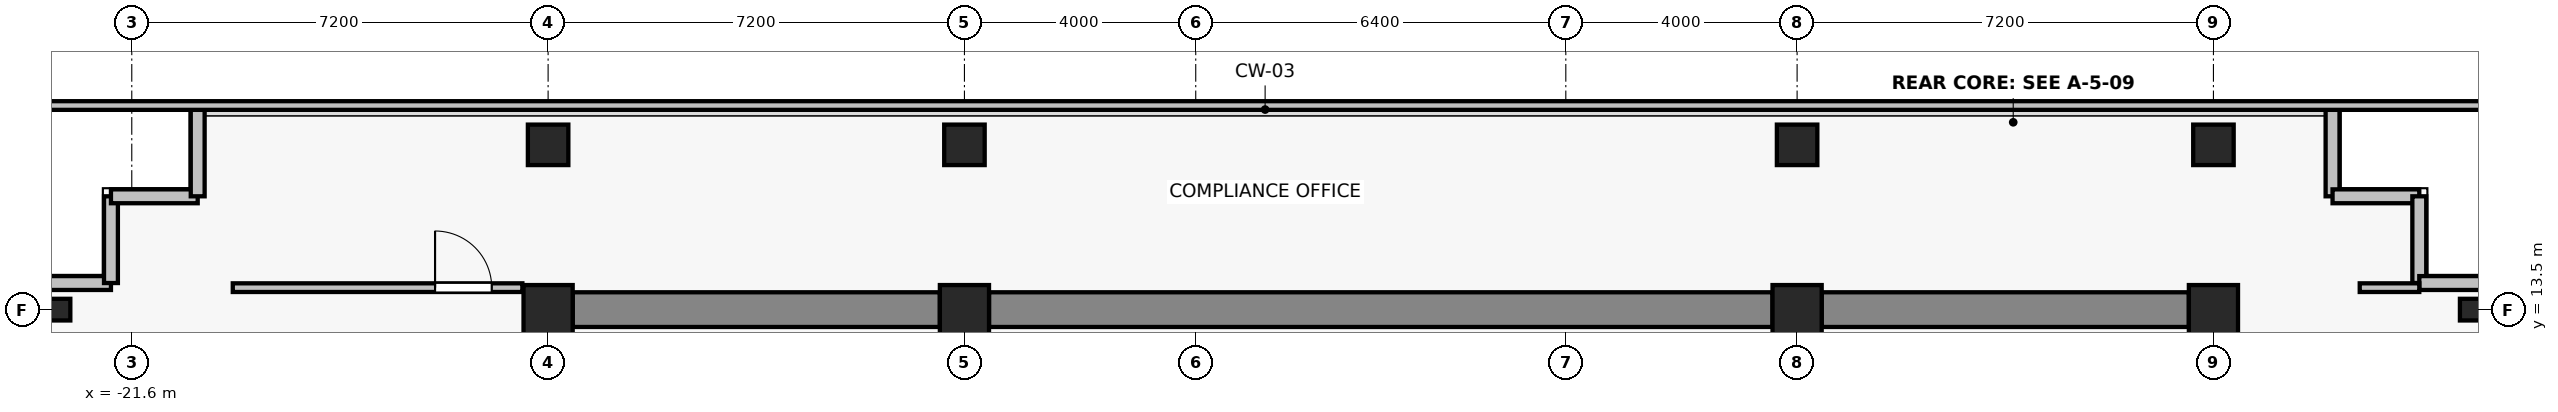
"""IFC4 building model, lengths in metres.
Left out: names, types, materials, properties, quantities, classifications, styles, units other than length and angle.
Written with IfcOpenShell. Run it as: python <this file> out.ifc"""

import sys

from ifc_helpers import new_model, si_unit, direction, frame, frame_2d, origin, origin_2d, place, context, subcontext, project, spatial, rectangle, i_section, extrude, source, transform, mapped, element, fill, save


model = new_model("IFC4")
c1 = context("Model", 3, precision=1e-05, world=origin(), true_north=direction((0.0, 1.0)))
c2 = subcontext(c1, "Body", "Model", "MODEL_VIEW")
j1 = project(units=[si_unit("LENGTHUNIT", "METRE"), si_unit("PLANEANGLEUNIT", "RADIAN")], contexts=[c1])
p1 = place(None, origin())
s1 = spatial("IfcSite", under=j1, at=p1, CompositionType="ELEMENT")
p2 = place(p1, origin())
s2 = spatial("IfcBuilding", under=s1, at=p2, CompositionType="ELEMENT")
p3 = place(p2, frame((0.0, 0.0, 228.7)))
s3 = spatial("IfcBuildingStorey", under=s2, at=p3, CompositionType="ELEMENT", Elevation=228.7)
for number, where, z_axis, x_axis in (
    (1, (-14.4, 13.5, 0.0), (0.0, 0.0, 1.0), (1.0, 0.0, 0.0)),
    (2, (-7.2, 13.5, 0.0), (0.0, 0.0, 1.0), (1.0, 0.0, 0.0)),
    (3, (7.2, 13.5, 0.0), (0.0, 0.0, 1.0), (1.0, 0.0, 0.0)),
    (4, (14.4, 13.5, 0.0), (0.0, 0.0, 1.0), (1.0, 0.0, 0.0)),
):
    element("IfcColumn", number, at=place(p3, frame(where, z_axis=z_axis, x_axis=x_axis)), inside=s3, PredefinedType="COLUMN", context=c2, shape_type="SweptSolid", body=[
        extrude(rectangle(XDim=0.85, YDim=0.85, at=origin_2d()), origin(), (0.0, 0.0, 1.0), 3.3),
    ])
for number, where, z_axis, x_axis in (
    (5, (-14.4, 16.35, 0.0), (0.0, 0.0, 1.0), (1.0, 0.0, 0.0)),
    (6, (-7.2, 16.35, 0.0), (0.0, 0.0, 1.0), (1.0, 0.0, 0.0)),
    (7, (7.2, 16.35, 0.0), (0.0, 0.0, 1.0), (1.0, 0.0, 0.0)),
    (8, (14.4, 16.35, 0.0), (0.0, 0.0, 1.0), (1.0, 0.0, 0.0)),
):
    element("IfcColumn", number, at=place(p3, frame(where, z_axis=z_axis, x_axis=x_axis)), inside=s3, PredefinedType="COLUMN", context=c2, shape_type="SweptSolid", body=[
        extrude(rectangle(XDim=0.7, YDim=0.7, at=origin_2d()), origin(), (0.0, 0.0, 1.0), 3.3),
    ])
for number, where, z_axis, x_axis in (
    (9, (-22.85, 13.5, 0.0), (0.0, 0.0, 1.0), (1.0, 0.0, 0.0)),
    (10, (18.85, 13.5, 0.0), (0.0, 0.0, 1.0), (1.0, 0.0, 0.0)),
):
    element("IfcColumn", number, at=place(p3, frame(where, z_axis=z_axis, x_axis=x_axis)), inside=s3, PredefinedType="COLUMN", context=c2, shape_type="SweptSolid", body=[
        extrude(i_section(OverallWidth=0.375, OverallDepth=0.375, WebThickness=0.017, FlangeThickness=0.027, FilletRadius=0.015, at=origin_2d()), origin(), (0.0, 0.0, 1.0), 3.3),
    ])
p4 = place(p3, frame((-13.975, 13.5, 0.0), z_axis=(0.0, 0.0, 1.0), x_axis=(1.0, 0.0, 0.0)))
e11 = element("IfcWall", 11, at=p4, inside=s3, PredefinedType="SHEAR", context=c2, shape_type="SweptSolid", body=[
    extrude(rectangle(XDim=6.35, YDim=0.6, at=frame_2d((3.175, 0.0))), origin(), (0.0, 0.0, 1.0), 3.075),
])
p5 = place(p3, frame((-6.775, 13.5, 0.0), z_axis=(0.0, 0.0, 1.0), x_axis=(1.0, 0.0, 0.0)))
e12 = element("IfcWall", 12, at=p5, inside=s3, PredefinedType="SHEAR", context=c2, shape_type="SweptSolid", body=[
    extrude(rectangle(XDim=13.55, YDim=0.6, at=frame_2d((6.775, 0.0))), origin(), (0.0, 0.0, 1.0), 3.075),
])
p6 = place(p3, frame((7.625, 13.5, 0.0), z_axis=(0.0, 0.0, 1.0), x_axis=(1.0, 0.0, 0.0)))
e13 = element("IfcWall", 13, at=p6, inside=s3, PredefinedType="SHEAR", context=c2, shape_type="SweptSolid", body=[
    extrude(rectangle(XDim=6.35, YDim=0.6, at=frame_2d((3.175, 0.0))), origin(), (0.0, 0.0, 1.0), 3.075),
])
for number, where, z_axis, x_axis in (
    (14, (-21.96, 13.96, 0.0), (0.0, 0.0, 1.0), (-1.0, 0.0, 0.0)),
    (15, (-21.96, 15.46, 0.0), (0.0, 0.0, 1.0), (0.0, -1.0, 0.0)),
    (16, (-20.46, 15.46, 0.0), (0.0, 0.0, 1.0), (-1.0, 0.0, 0.0)),
    (17, (-20.46, 16.96, 0.0), (0.0, 0.0, 1.0), (0.0, -1.0, 0.0)),
    (18, (16.46, 15.46, 0.0), (0.0, 0.0, 1.0), (0.0, 1.0, 0.0)),
    (19, (17.96, 15.46, 0.0), (0.0, 0.0, 1.0), (-1.0, 0.0, 0.0)),
    (20, (17.96, 13.96, 0.0), (0.0, 0.0, 1.0), (0.0, 1.0, 0.0)),
    (21, (19.46, 13.96, 0.0), (0.0, 0.0, 1.0), (-1.0, 0.0, 0.0)),
):
    element("IfcWall", number, at=place(p3, frame(where, z_axis=z_axis, x_axis=x_axis)), inside=s3, PredefinedType="SOLIDWALL", context=c2, shape_type="SweptSolid", body=[
        extrude(rectangle(XDim=1.5, YDim=0.24, at=frame_2d((0.75, 0.0))), origin(), (0.0, 0.0, 1.0), 3.075),
    ])
p7 = place(p3, frame((-19.853, 13.88, 0.0), z_axis=(0.0, 0.0, 1.0), x_axis=(1.0, 0.0, 0.0)))
e22 = element("IfcWall", 22, at=p7, inside=s3, PredefinedType="PARTITIONING", context=c2, shape_type="SweptSolid", body=[
    extrude(rectangle(XDim=5.008, YDim=0.15, at=frame_2d((2.504, 0.0))), origin(), (0.0, 0.0, 1.0), 3.075),
])
p8 = place(p7, frame((3.498, 0.0, 0.0)))
e23 = element("IfcOpeningElement", 23, at=p8, cuts=e22, PredefinedType="OPENING", context=c2, shape_type="SweptSolid", body=[
    extrude(rectangle(XDim=0.98, YDim=2.15, at=frame_2d((0.49, 1.075))), frame((0.0, 0.085, 0.0), z_axis=(0.0, -1.0, 0.0), x_axis=(1.0, 0.0, 0.0)), (0.0, 0.0, 1.0), 0.17),
])
p9 = place(p3, frame((16.93, 13.88, 0.0), z_axis=(0.0, 0.0, 1.0), x_axis=(1.0, 0.0, 0.0)))
e24 = element("IfcWall", 24, at=p9, inside=s3, PredefinedType="PARTITIONING", context=c2, shape_type="SweptSolid", body=[
    extrude(rectangle(XDim=1.03, YDim=0.15, at=frame_2d((0.515, 0.0))), origin(), (0.0, 0.0, 1.0), 3.075),
])
p10 = place(p3, frame((-23.53, 17.03, 0.0), z_axis=(0.0, 0.0, 1.0), x_axis=(1.0, 0.0, 0.0)))
e25 = element("IfcWall", 25, at=p10, inside=s3, PredefinedType="PARTITIONING", context=c2, shape_type="SweptSolid", body=[
    extrude(rectangle(XDim=43.06, YDim=0.15, at=frame_2d((21.53, 0.0))), origin(), (0.0, 0.0, 1.0), 2.59),
])
m1 = source(origin(), c2, "Body", "SweptSolid", [
    extrude(rectangle(XDim=0.98, YDim=2.15, at=frame_2d((0.49, 1.075))), frame((0.0, 0.025, 0.0), z_axis=(0.0, -1.0, 0.0), x_axis=(1.0, 0.0, 0.0)), (0.0, 0.0, 1.0), 0.05),
])
p11 = place(p8, origin())
e26 = element("IfcDoor", 26, at=p11, inside=s3, OperationType="SINGLE_SWING_LEFT", PredefinedType="DOOR", context=c2, shape_type="MappedRepresentation", body=[
    mapped(m1, transform((0.0, 0.0, 0.0), x_axis=(1.0, 0.0, 0.0), y_axis=(0.0, 1.0, 0.0), z_axis=(0.0, 0.0, 1.0), scale=1.0)),
])
fill(e23, e26)
save(model, sys.argv[1])
